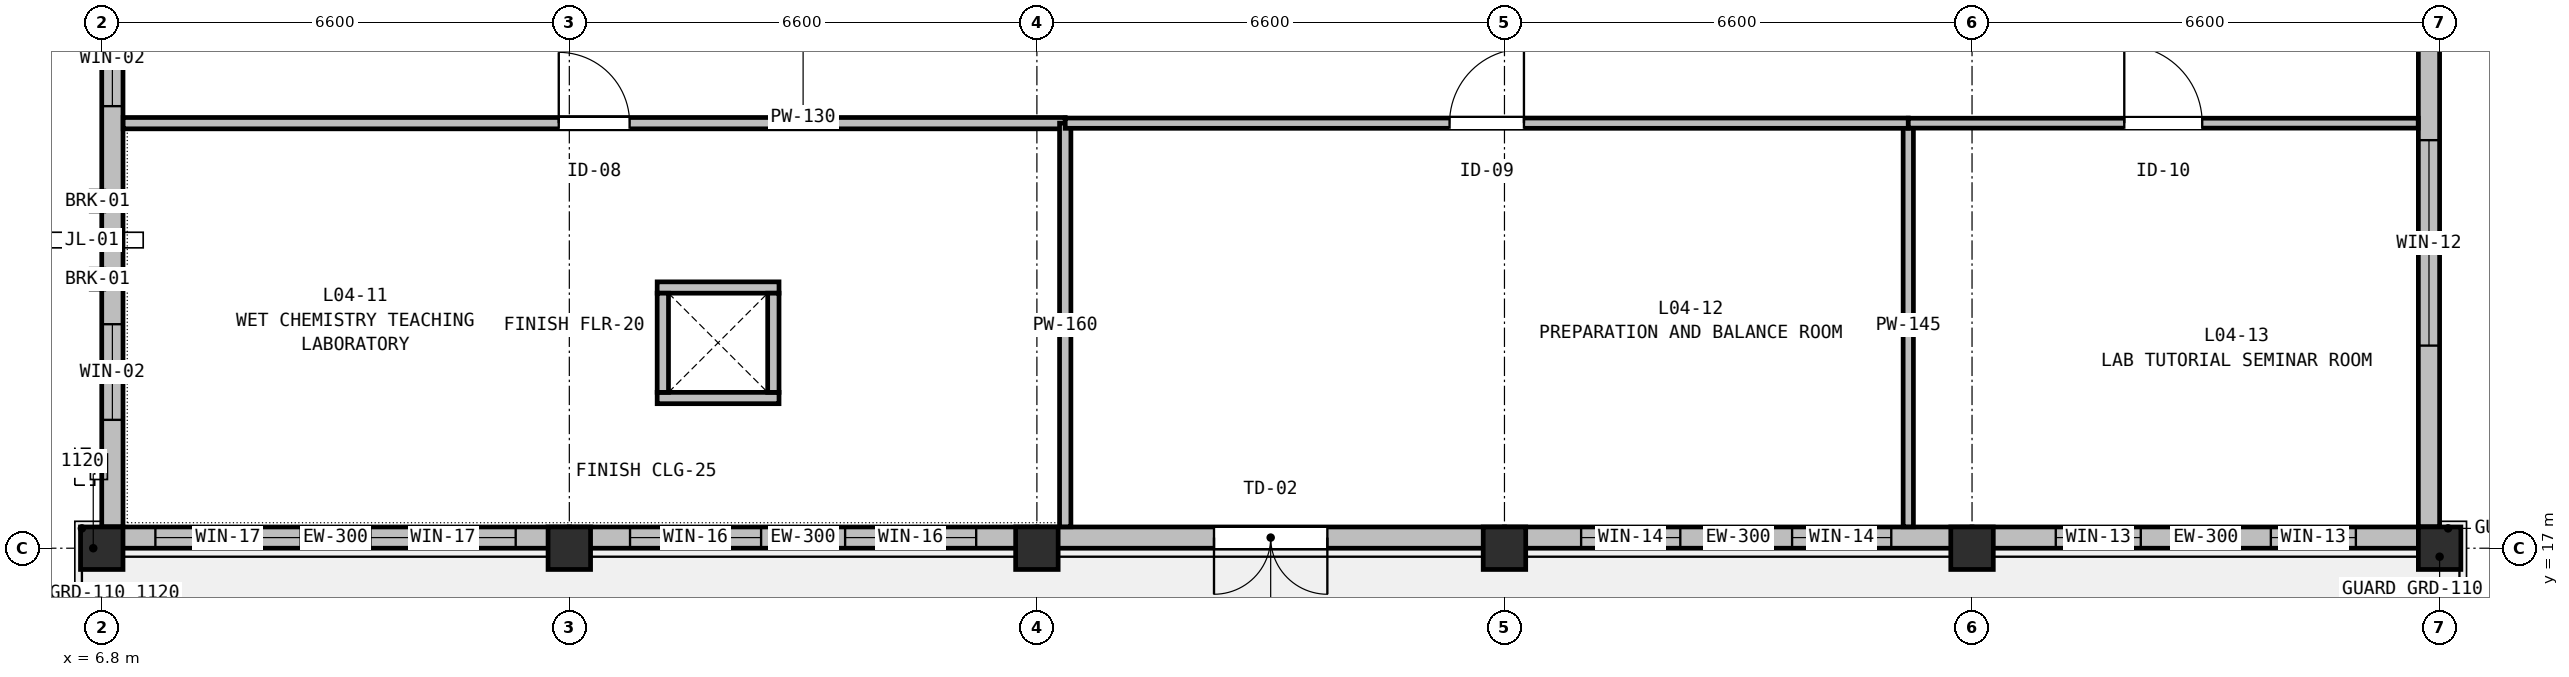
"""IFC4 building model, lengths in metres.
Left out: names, types, materials, properties, quantities, classifications, styles, units other than length and angle.
Written with IfcOpenShell. Run it as: python <this file> out.ifc"""

import sys

from ifc_helpers import new_model, si_unit, direction, frame, frame_2d, origin, origin_2d, place, context, subcontext, project, spatial, rectangle, extrude, element, fill, save


model = new_model("IFC4")
c1 = context("Model", 3, precision=1e-05, world=origin(), true_north=direction((0.0, 1.0)))
c2 = subcontext(c1, "Body", "Model", "MODEL_VIEW")
j1 = project(units=[si_unit("LENGTHUNIT", "METRE"), si_unit("PLANEANGLEUNIT", "RADIAN")], contexts=[c1])
p1 = place(None, origin())
s1 = spatial("IfcSite", under=j1, at=p1, CompositionType="ELEMENT")
p2 = place(p1, origin())
s2 = spatial("IfcBuilding", under=s1, at=p2, CompositionType="ELEMENT")
p3 = place(p2, frame((0.0, 0.0, 19.5)))
s3 = spatial("IfcBuildingStorey", under=s2, at=p3, CompositionType="ELEMENT", Elevation=19.5)
for number, where, z_axis, x_axis in (
    (1, (6.8, 17.0, 0.0), (0.0, 0.0, 1.0), (1.0, 0.0, 0.0)),
    (2, (13.4, 17.0, 0.0), (0.0, 0.0, 1.0), (1.0, 0.0, 0.0)),
    (3, (20.0, 17.0, 0.0), (0.0, 0.0, 1.0), (1.0, 0.0, 0.0)),
    (4, (26.6, 17.0, 0.0), (0.0, 0.0, 1.0), (1.0, 0.0, 0.0)),
    (5, (33.2, 17.0, 0.0), (0.0, 0.0, 1.0), (1.0, 0.0, 0.0)),
    (6, (39.8, 17.0, 0.0), (0.0, 0.0, 1.0), (1.0, 0.0, 0.0)),
):
    element("IfcColumn", number, at=place(p3, frame(where, z_axis=z_axis, x_axis=x_axis)), inside=s3, PredefinedType="COLUMN", context=c2, shape_type="SweptSolid", body=[
        extrude(rectangle(XDim=0.6, YDim=0.6, at=origin_2d()), origin(), (0.0, 0.0, 1.0), 4.5),
    ])
p4 = place(p3, frame((6.95, 17.3, 0.0), z_axis=(0.0, 0.0, 1.0), x_axis=(0.0, 1.0, 0.0)))
e7 = element("IfcWall", 7, at=p4, inside=s3, PredefinedType="STANDARD", context=c2, shape_type="SweptSolid", body=[
    extrude(rectangle(XDim=8.1, YDim=0.3, at=frame_2d((4.05, 0.0))), origin(), (0.0, 0.0, 1.0), 3.885),
])
p5 = place(p4, frame((1.512, 0.0, 0.9)))
e8 = element("IfcOpeningElement", 8, at=p5, cuts=e7, PredefinedType="OPENING", context=c2, shape_type="SweptSolid", body=[
    extrude(rectangle(XDim=1.35, YDim=2.1, at=frame_2d((0.675, 1.05))), frame((0.0, 0.16, 0.0), z_axis=(0.0, -1.0, 0.0), x_axis=(1.0, 0.0, 0.0)), (0.0, 0.0, 1.0), 0.32),
])
p6 = place(p4, frame((5.94, 0.0, 0.9)))
e9 = element("IfcOpeningElement", 9, at=p6, cuts=e7, PredefinedType="OPENING", context=c2, shape_type="SweptSolid", body=[
    extrude(rectangle(XDim=1.35, YDim=2.1, at=frame_2d((0.675, 1.05))), frame((0.0, 0.16, 0.0), z_axis=(0.0, -1.0, 0.0), x_axis=(1.0, 0.0, 0.0)), (0.0, 0.0, 1.0), 0.32),
])
p7 = place(p3, frame((39.65, 25.4, 0.0), z_axis=(0.0, 0.0, 1.0), x_axis=(0.0, -1.0, 0.0)))
e10 = element("IfcWall", 10, at=p7, inside=s3, PredefinedType="STANDARD", context=c2, shape_type="SweptSolid", body=[
    extrude(rectangle(XDim=8.1, YDim=0.3, at=frame_2d((4.05, 0.0))), origin(), (0.0, 0.0, 1.0), 3.885),
])
p8 = place(p7, frame((2.64, 0.0, 0.75)))
e11 = element("IfcOpeningElement", 11, at=p8, cuts=e10, PredefinedType="OPENING", context=c2, shape_type="SweptSolid", body=[
    extrude(rectangle(XDim=2.9, YDim=2.2, at=frame_2d((1.45, 1.1))), frame((0.0, 0.16, 0.0), z_axis=(0.0, -1.0, 0.0), x_axis=(1.0, 0.0, 0.0)), (0.0, 0.0, 1.0), 0.32),
])
p9 = place(p3, frame((39.8, 17.15, 0.0), z_axis=(0.0, 0.0, 1.0), x_axis=(-1.0, 0.0, 0.0)))
e12 = element("IfcWall", 12, at=p9, inside=s3, PredefinedType="STANDARD", context=c2, shape_type="SweptSolid", body=[
    extrude(rectangle(XDim=6.6, YDim=0.3, at=frame_2d((3.3, 0.0))), origin(), (0.0, 0.0, 1.0), 3.735),
])
p10 = place(p9, frame((1.182, 0.0, 0.9)))
e13 = element("IfcOpeningElement", 13, at=p10, cuts=e12, PredefinedType="OPENING", context=c2, shape_type="SweptSolid", body=[
    extrude(rectangle(XDim=1.2, YDim=1.5, at=frame_2d((0.6, 0.75))), frame((0.0, 0.16, 0.0), z_axis=(0.0, -1.0, 0.0), x_axis=(1.0, 0.0, 0.0)), (0.0, 0.0, 1.0), 0.32),
])
p11 = place(p9, frame((4.218, 0.0, 0.9)))
e14 = element("IfcOpeningElement", 14, at=p11, cuts=e12, PredefinedType="OPENING", context=c2, shape_type="SweptSolid", body=[
    extrude(rectangle(XDim=1.2, YDim=1.5, at=frame_2d((0.6, 0.75))), frame((0.0, 0.16, 0.0), z_axis=(0.0, -1.0, 0.0), x_axis=(1.0, 0.0, 0.0)), (0.0, 0.0, 1.0), 0.32),
])
p12 = place(p3, frame((33.2, 17.15, 0.0), z_axis=(0.0, 0.0, 1.0), x_axis=(-1.0, 0.0, 0.0)))
e15 = element("IfcWall", 15, at=p12, inside=s3, PredefinedType="STANDARD", context=c2, shape_type="SweptSolid", body=[
    extrude(rectangle(XDim=6.6, YDim=0.3, at=frame_2d((3.3, 0.0))), origin(), (0.0, 0.0, 1.0), 3.735),
])
p13 = place(p12, frame((1.14, 0.0, 0.9)))
e16 = element("IfcOpeningElement", 16, at=p13, cuts=e15, PredefinedType="OPENING", context=c2, shape_type="SweptSolid", body=[
    extrude(rectangle(XDim=1.4, YDim=1.55, at=frame_2d((0.7, 0.775))), frame((0.0, 0.16, 0.0), z_axis=(0.0, -1.0, 0.0), x_axis=(1.0, 0.0, 0.0)), (0.0, 0.0, 1.0), 0.32),
])
p14 = place(p12, frame((4.118, 0.0, 0.9)))
e17 = element("IfcOpeningElement", 17, at=p14, cuts=e15, PredefinedType="OPENING", context=c2, shape_type="SweptSolid", body=[
    extrude(rectangle(XDim=1.4, YDim=1.55, at=frame_2d((0.7, 0.775))), frame((0.0, 0.16, 0.0), z_axis=(0.0, -1.0, 0.0), x_axis=(1.0, 0.0, 0.0)), (0.0, 0.0, 1.0), 0.32),
])
p15 = place(p3, frame((26.6, 17.15, 0.0), z_axis=(0.0, 0.0, 1.0), x_axis=(-1.0, 0.0, 0.0)))
e18 = element("IfcWall", 18, at=p15, inside=s3, PredefinedType="STANDARD", context=c2, shape_type="SweptSolid", body=[
    extrude(rectangle(XDim=6.6, YDim=0.3, at=frame_2d((3.3, 0.0))), origin(), (0.0, 0.0, 1.0), 3.735),
])
p16 = place(p15, frame((2.5, 0.0, 0.0)))
e19 = element("IfcOpeningElement", 19, at=p16, cuts=e18, PredefinedType="OPENING", context=c2, shape_type="SweptSolid", body=[
    extrude(rectangle(XDim=1.6, YDim=2.2, at=frame_2d((0.8, 1.1))), frame((0.0, 0.16, 0.0), z_axis=(0.0, -1.0, 0.0), x_axis=(1.0, 0.0, 0.0)), (0.0, 0.0, 1.0), 0.32),
])
p17 = place(p3, frame((20.0, 17.15, 0.0), z_axis=(0.0, 0.0, 1.0), x_axis=(-1.0, 0.0, 0.0)))
e20 = element("IfcWall", 20, at=p17, inside=s3, PredefinedType="STANDARD", context=c2, shape_type="SweptSolid", body=[
    extrude(rectangle(XDim=6.6, YDim=0.3, at=frame_2d((3.3, 0.0))), origin(), (0.0, 0.0, 1.0), 3.735),
])
p18 = place(p17, frame((0.857, 0.0, 0.9)))
e21 = element("IfcOpeningElement", 21, at=p18, cuts=e20, PredefinedType="OPENING", context=c2, shape_type="SweptSolid", body=[
    extrude(rectangle(XDim=1.85, YDim=1.6, at=frame_2d((0.925, 0.8))), frame((0.0, 0.16, 0.0), z_axis=(0.0, -1.0, 0.0), x_axis=(1.0, 0.0, 0.0)), (0.0, 0.0, 1.0), 0.32),
])
p19 = place(p17, frame((3.893, 0.0, 0.9)))
e22 = element("IfcOpeningElement", 22, at=p19, cuts=e20, PredefinedType="OPENING", context=c2, shape_type="SweptSolid", body=[
    extrude(rectangle(XDim=1.85, YDim=1.6, at=frame_2d((0.925, 0.8))), frame((0.0, 0.16, 0.0), z_axis=(0.0, -1.0, 0.0), x_axis=(1.0, 0.0, 0.0)), (0.0, 0.0, 1.0), 0.32),
])
p20 = place(p3, frame((13.4, 17.15, 0.0), z_axis=(0.0, 0.0, 1.0), x_axis=(-1.0, 0.0, 0.0)))
e23 = element("IfcWall", 23, at=p20, inside=s3, PredefinedType="STANDARD", context=c2, shape_type="SweptSolid", body=[
    extrude(rectangle(XDim=6.6, YDim=0.3, at=frame_2d((3.3, 0.0))), origin(), (0.0, 0.0, 1.0), 3.735),
])
p21 = place(p20, frame((0.757, 0.0, 0.9)))
e24 = element("IfcOpeningElement", 24, at=p21, cuts=e23, PredefinedType="OPENING", context=c2, shape_type="SweptSolid", body=[
    extrude(rectangle(XDim=2.05, YDim=1.65, at=frame_2d((1.025, 0.825))), frame((0.0, 0.16, 0.0), z_axis=(0.0, -1.0, 0.0), x_axis=(1.0, 0.0, 0.0)), (0.0, 0.0, 1.0), 0.32),
])
p22 = place(p20, frame((3.793, 0.0, 0.9)))
e25 = element("IfcOpeningElement", 25, at=p22, cuts=e23, PredefinedType="OPENING", context=c2, shape_type="SweptSolid", body=[
    extrude(rectangle(XDim=2.05, YDim=1.65, at=frame_2d((1.025, 0.825))), frame((0.0, 0.16, 0.0), z_axis=(0.0, -1.0, 0.0), x_axis=(1.0, 0.0, 0.0)), (0.0, 0.0, 1.0), 0.32),
])
for number, where, z_axis, x_axis in (
    (26, (14.64, 19.12, 0.0), (0.0, 0.0, 1.0), (1.0, 0.0, 0.0)),
    (27, (14.64, 20.68, 0.0), (0.0, 0.0, 1.0), (1.0, 0.0, 0.0)),
):
    element("IfcWall", number, at=place(p3, frame(where, z_axis=z_axis, x_axis=x_axis)), inside=s3, PredefinedType="PARTITIONING", context=c2, shape_type="SweptSolid", body=[
        extrude(rectangle(XDim=1.72, YDim=0.16, at=frame_2d((0.86, 0.0))), origin(), (0.0, 0.0, 1.0), 4.195),
    ])
for number, where, z_axis, x_axis in (
    (28, (14.72, 19.2, 0.0), (0.0, 0.0, 1.0), (0.0, 1.0, 0.0)),
    (29, (16.28, 19.2, 0.0), (0.0, 0.0, 1.0), (0.0, 1.0, 0.0)),
):
    element("IfcWall", number, at=place(p3, frame(where, z_axis=z_axis, x_axis=x_axis)), inside=s3, PredefinedType="PARTITIONING", context=c2, shape_type="SweptSolid", body=[
        extrude(rectangle(XDim=1.4, YDim=0.16, at=frame_2d((0.7, 0.0))), origin(), (0.0, 0.0, 1.0), 4.195),
    ])
p23 = place(p3, frame((7.102, 23.0, 0.0), z_axis=(0.0, 0.0, 1.0), x_axis=(1.0, 0.0, 0.0)))
e30 = element("IfcWall", 30, at=p23, inside=s3, PredefinedType="PARTITIONING", context=c2, shape_type="SweptSolid", body=[
    extrude(rectangle(XDim=13.298, YDim=0.16, at=frame_2d((6.649, 0.0))), origin(), (0.0, 0.0, 1.0), 3.735),
])
p24 = place(p23, frame((6.149, 0.0, 0.0)))
e31 = element("IfcOpeningElement", 31, at=p24, cuts=e30, PredefinedType="OPENING", context=c2, shape_type="SweptSolid", body=[
    extrude(rectangle(XDim=1.0, YDim=2.06, at=frame_2d((0.5, 1.03))), frame((0.0, 0.09, 0.0), z_axis=(0.0, -1.0, 0.0), x_axis=(1.0, 0.0, 0.0)), (0.0, 0.0, 1.0), 0.18),
])
p25 = place(p3, frame((20.4, 23.0, 0.0), z_axis=(0.0, 0.0, 1.0), x_axis=(0.0, -1.0, 0.0)))
e32 = element("IfcWall", 32, at=p25, inside=s3, PredefinedType="PARTITIONING", context=c2, shape_type="SweptSolid", body=[
    extrude(rectangle(XDim=5.698, YDim=0.16, at=frame_2d((2.849, 0.0))), origin(), (0.0, 0.0, 1.0), 4.195),
])
p26 = place(p3, frame((32.3, 23.0, 0.0), z_axis=(0.0, 0.0, 1.0), x_axis=(0.0, -1.0, 0.0)))
e33 = element("IfcWall", 33, at=p26, inside=s3, PredefinedType="PARTITIONING", context=c2, shape_type="SweptSolid", body=[
    extrude(rectangle(XDim=5.698, YDim=0.145, at=frame_2d((2.849, 0.0))), origin(), (0.0, 0.0, 1.0), 4.195),
])
p27 = place(p3, frame((20.4, 23.0, 0.0), z_axis=(0.0, 0.0, 1.0), x_axis=(1.0, 0.0, 0.0)))
e34 = element("IfcWall", 34, at=p27, inside=s3, PredefinedType="PARTITIONING", context=c2, shape_type="SweptSolid", body=[
    extrude(rectangle(XDim=11.9, YDim=0.145, at=frame_2d((5.95, 0.0))), origin(), (0.0, 0.0, 1.0), 3.735),
])
p28 = place(p27, frame((5.425, 0.0, 0.0)))
e35 = element("IfcOpeningElement", 35, at=p28, cuts=e34, PredefinedType="OPENING", context=c2, shape_type="SweptSolid", body=[
    extrude(rectangle(XDim=1.05, YDim=2.06, at=frame_2d((0.525, 1.03))), frame((0.0, 0.083, 0.0), z_axis=(0.0, -1.0, 0.0), x_axis=(1.0, 0.0, 0.0)), (0.0, 0.0, 1.0), 0.165),
])
p29 = place(p3, frame((32.3, 23.0, 0.0), z_axis=(0.0, 0.0, 1.0), x_axis=(1.0, 0.0, 0.0)))
e36 = element("IfcWall", 36, at=p29, inside=s3, PredefinedType="PARTITIONING", context=c2, shape_type="SweptSolid", body=[
    extrude(rectangle(XDim=7.198, YDim=0.14, at=frame_2d((3.599, 0.0))), origin(), (0.0, 0.0, 1.0), 3.735),
])
p30 = place(p29, frame((3.049, 0.0, 0.0)))
e37 = element("IfcOpeningElement", 37, at=p30, cuts=e36, PredefinedType="OPENING", context=c2, shape_type="SweptSolid", body=[
    extrude(rectangle(XDim=1.1, YDim=2.06, at=frame_2d((0.55, 1.03))), frame((0.0, 0.08, 0.0), z_axis=(0.0, -1.0, 0.0), x_axis=(1.0, 0.0, 0.0)), (0.0, 0.0, 1.0), 0.16),
])
p31 = place(p16, origin())
e38 = element("IfcDoor", 38, at=p31, inside=s3, OperationType="DOUBLE_DOOR_SINGLE_SWING", PredefinedType="DOOR", context=c2, shape_type="SweptSolid", body=[
    extrude(rectangle(XDim=1.6, YDim=2.2, at=frame_2d((0.8, 1.1))), frame((0.0, 0.025, 0.0), z_axis=(0.0, -1.0, 0.0), x_axis=(1.0, 0.0, 0.0)), (0.0, 0.0, 1.0), 0.05),
])
fill(e19, e38)
p32 = place(p5, origin())
e39 = element("IfcWindow", 39, at=p32, inside=s3, PartitioningType="SINGLE_PANEL", PredefinedType="WINDOW", context=c2, shape_type="SweptSolid", body=[
    extrude(rectangle(XDim=1.35, YDim=2.1, at=frame_2d((0.675, 1.05))), frame((0.0, 0.03, 0.0), z_axis=(0.0, -1.0, 0.0), x_axis=(1.0, 0.0, 0.0)), (0.0, 0.0, 1.0), 0.06),
])
fill(e8, e39)
p33 = place(p6, origin())
e40 = element("IfcWindow", 40, at=p33, inside=s3, PartitioningType="SINGLE_PANEL", PredefinedType="WINDOW", context=c2, shape_type="SweptSolid", body=[
    extrude(rectangle(XDim=1.35, YDim=2.1, at=frame_2d((0.675, 1.05))), frame((0.0, 0.03, 0.0), z_axis=(0.0, -1.0, 0.0), x_axis=(1.0, 0.0, 0.0)), (0.0, 0.0, 1.0), 0.06),
])
fill(e9, e40)
p34 = place(p8, origin())
e41 = element("IfcWindow", 41, at=p34, inside=s3, PartitioningType="SINGLE_PANEL", PredefinedType="WINDOW", context=c2, shape_type="SweptSolid", body=[
    extrude(rectangle(XDim=2.9, YDim=2.2, at=frame_2d((1.45, 1.1))), frame((0.0, 0.03, 0.0), z_axis=(0.0, -1.0, 0.0), x_axis=(1.0, 0.0, 0.0)), (0.0, 0.0, 1.0), 0.06),
])
fill(e11, e41)
p35 = place(p10, origin())
e42 = element("IfcWindow", 42, at=p35, inside=s3, PartitioningType="SINGLE_PANEL", PredefinedType="WINDOW", context=c2, shape_type="SweptSolid", body=[
    extrude(rectangle(XDim=1.2, YDim=1.5, at=frame_2d((0.6, 0.75))), frame((0.0, 0.03, 0.0), z_axis=(0.0, -1.0, 0.0), x_axis=(1.0, 0.0, 0.0)), (0.0, 0.0, 1.0), 0.06),
])
fill(e13, e42)
p36 = place(p11, origin())
e43 = element("IfcWindow", 43, at=p36, inside=s3, PartitioningType="SINGLE_PANEL", PredefinedType="WINDOW", context=c2, shape_type="SweptSolid", body=[
    extrude(rectangle(XDim=1.2, YDim=1.5, at=frame_2d((0.6, 0.75))), frame((0.0, 0.03, 0.0), z_axis=(0.0, -1.0, 0.0), x_axis=(1.0, 0.0, 0.0)), (0.0, 0.0, 1.0), 0.06),
])
fill(e14, e43)
p37 = place(p13, origin())
e44 = element("IfcWindow", 44, at=p37, inside=s3, PartitioningType="SINGLE_PANEL", PredefinedType="WINDOW", context=c2, shape_type="SweptSolid", body=[
    extrude(rectangle(XDim=1.4, YDim=1.55, at=frame_2d((0.7, 0.775))), frame((0.0, 0.03, 0.0), z_axis=(0.0, -1.0, 0.0), x_axis=(1.0, 0.0, 0.0)), (0.0, 0.0, 1.0), 0.06),
])
fill(e16, e44)
p38 = place(p14, origin())
e45 = element("IfcWindow", 45, at=p38, inside=s3, PartitioningType="SINGLE_PANEL", PredefinedType="WINDOW", context=c2, shape_type="SweptSolid", body=[
    extrude(rectangle(XDim=1.4, YDim=1.55, at=frame_2d((0.7, 0.775))), frame((0.0, 0.03, 0.0), z_axis=(0.0, -1.0, 0.0), x_axis=(1.0, 0.0, 0.0)), (0.0, 0.0, 1.0), 0.06),
])
fill(e17, e45)
p39 = place(p18, origin())
e46 = element("IfcWindow", 46, at=p39, inside=s3, PartitioningType="SINGLE_PANEL", PredefinedType="WINDOW", context=c2, shape_type="SweptSolid", body=[
    extrude(rectangle(XDim=1.85, YDim=1.6, at=frame_2d((0.925, 0.8))), frame((0.0, 0.03, 0.0), z_axis=(0.0, -1.0, 0.0), x_axis=(1.0, 0.0, 0.0)), (0.0, 0.0, 1.0), 0.06),
])
fill(e21, e46)
p40 = place(p19, origin())
e47 = element("IfcWindow", 47, at=p40, inside=s3, PartitioningType="SINGLE_PANEL", PredefinedType="WINDOW", context=c2, shape_type="SweptSolid", body=[
    extrude(rectangle(XDim=1.85, YDim=1.6, at=frame_2d((0.925, 0.8))), frame((0.0, 0.03, 0.0), z_axis=(0.0, -1.0, 0.0), x_axis=(1.0, 0.0, 0.0)), (0.0, 0.0, 1.0), 0.06),
])
fill(e22, e47)
p41 = place(p21, origin())
e48 = element("IfcWindow", 48, at=p41, inside=s3, PartitioningType="SINGLE_PANEL", PredefinedType="WINDOW", context=c2, shape_type="SweptSolid", body=[
    extrude(rectangle(XDim=2.05, YDim=1.65, at=frame_2d((1.025, 0.825))), frame((0.0, 0.03, 0.0), z_axis=(0.0, -1.0, 0.0), x_axis=(1.0, 0.0, 0.0)), (0.0, 0.0, 1.0), 0.06),
])
fill(e24, e48)
p42 = place(p22, origin())
e49 = element("IfcWindow", 49, at=p42, inside=s3, PartitioningType="SINGLE_PANEL", PredefinedType="WINDOW", context=c2, shape_type="SweptSolid", body=[
    extrude(rectangle(XDim=2.05, YDim=1.65, at=frame_2d((1.025, 0.825))), frame((0.0, 0.03, 0.0), z_axis=(0.0, -1.0, 0.0), x_axis=(1.0, 0.0, 0.0)), (0.0, 0.0, 1.0), 0.06),
])
fill(e25, e49)
p43 = place(p24, origin())
e50 = element("IfcDoor", 50, at=p43, inside=s3, OperationType="SINGLE_SWING_LEFT", PredefinedType="DOOR", context=c2, shape_type="SweptSolid", body=[
    extrude(rectangle(XDim=1.0, YDim=2.06, at=frame_2d((0.5, 1.03))), frame((0.0, 0.025, 0.0), z_axis=(0.0, -1.0, 0.0), x_axis=(1.0, 0.0, 0.0)), (0.0, 0.0, 1.0), 0.05),
])
fill(e31, e50)
p44 = place(p28, origin())
e51 = element("IfcDoor", 51, at=p44, inside=s3, OperationType="SINGLE_SWING_RIGHT", PredefinedType="DOOR", context=c2, shape_type="SweptSolid", body=[
    extrude(rectangle(XDim=1.05, YDim=2.06, at=frame_2d((0.525, 1.03))), frame((0.0, 0.025, 0.0), z_axis=(0.0, -1.0, 0.0), x_axis=(1.0, 0.0, 0.0)), (0.0, 0.0, 1.0), 0.05),
])
fill(e35, e51)
p45 = place(p30, origin())
e52 = element("IfcDoor", 52, at=p45, inside=s3, OperationType="SINGLE_SWING_LEFT", PredefinedType="DOOR", context=c2, shape_type="SweptSolid", body=[
    extrude(rectangle(XDim=1.1, YDim=2.06, at=frame_2d((0.55, 1.03))), frame((0.0, 0.025, 0.0), z_axis=(0.0, -1.0, 0.0), x_axis=(1.0, 0.0, 0.0)), (0.0, 0.0, 1.0), 0.05),
])
fill(e37, e52)
save(model, sys.argv[1])
